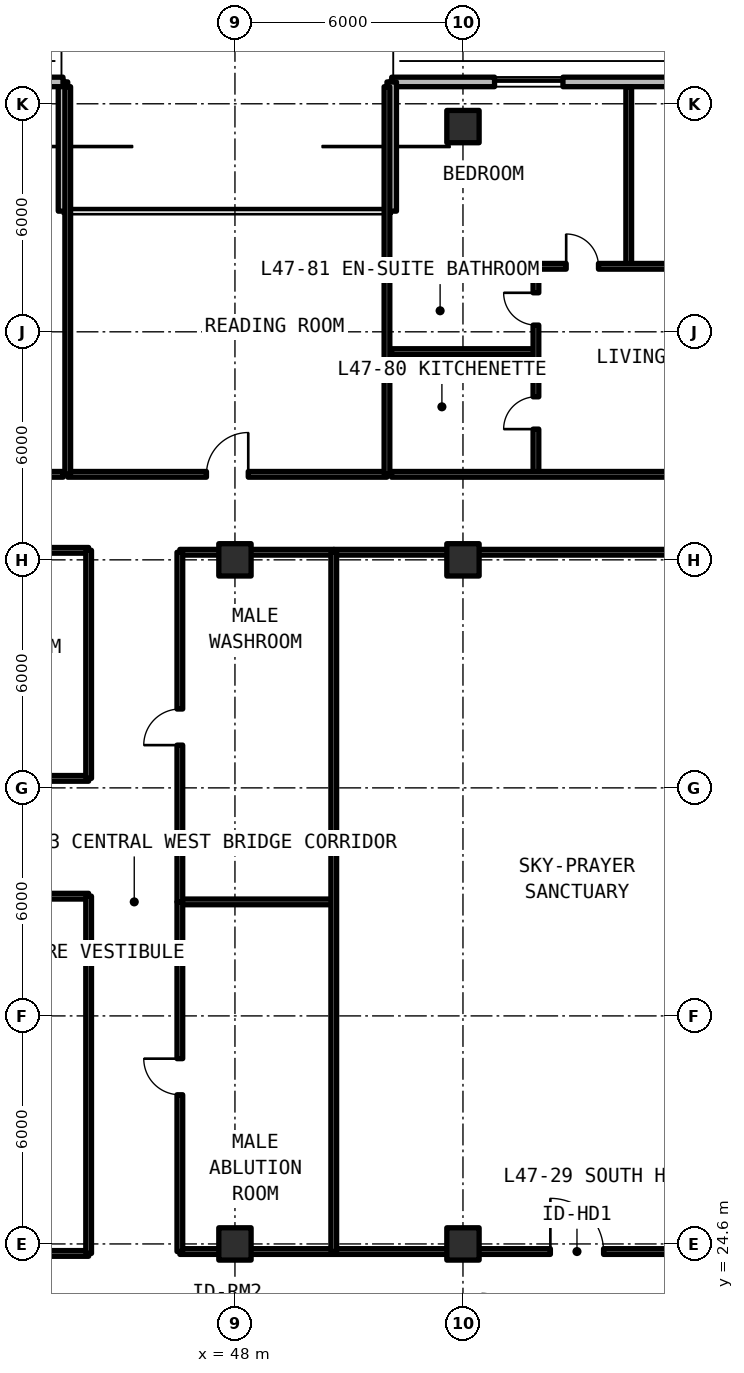
"""IFC4 building model, lengths in metres.
Left out: names, types, materials, properties, quantities, classifications, styles, units other than length and angle.
Written with IfcOpenShell. Run it as: python <this file> out.ifc"""

import sys

from ifc_helpers import new_model, si_unit, direction, frame, frame_2d, origin, origin_2d, place, context, subcontext, project, spatial, rectangle, extrude, element, fill, save


model = new_model("IFC4")
c1 = context("Model", 3, precision=1e-05, world=origin(), true_north=direction((0.0, 1.0)))
c2 = subcontext(c1, "Body", "Model", "MODEL_VIEW")
j1 = project(units=[si_unit("LENGTHUNIT", "METRE"), si_unit("PLANEANGLEUNIT", "RADIAN")], contexts=[c1])
p1 = place(None, origin())
s1 = spatial("IfcSite", under=j1, at=p1, CompositionType="ELEMENT")
p2 = place(p1, origin())
s2 = spatial("IfcBuilding", under=s1, at=p2, CompositionType="ELEMENT")
p3 = place(p2, frame((0.0, 0.0, 169.29)))
s3 = spatial("IfcBuildingStorey", under=s2, at=p3, CompositionType="ELEMENT", Elevation=169.29)
for number, where, z_axis, x_axis in (
    (1, (48.0, 24.6, 0.0), (0.0, 0.0, 1.0), (1.0, 0.0, 0.0)),
    (2, (48.0, 42.6, 0.0), (0.0, 0.0, 1.0), (1.0, 0.0, 0.0)),
    (3, (54.0, 24.6, 0.0), (0.0, 0.0, 1.0), (1.0, 0.0, 0.0)),
    (4, (54.0, 42.6, 0.0), (0.0, 0.0, 1.0), (1.0, 0.0, 0.0)),
    (5, (54.0, 54.0, 0.0), (0.0, 0.0, 1.0), (1.0, 0.0, 0.0)),
):
    element("IfcColumn", number, at=place(p3, frame(where, z_axis=z_axis, x_axis=x_axis)), inside=s3, PredefinedType="COLUMN", context=c2, shape_type="SweptSolid", body=[
        extrude(rectangle(XDim=0.85, YDim=0.85, at=origin_2d()), origin(), (0.0, 0.0, 1.0), 3.63),
    ])
p4 = place(p3, frame((95.748, 55.175, 0.0), z_axis=(0.0, 0.0, 1.0), x_axis=(-1.0, 0.0, 0.0)))
e6 = element("IfcWall", 6, at=p4, inside=s3, PredefinedType="SOLIDWALL", context=c2, shape_type="SweptSolid", body=[
    extrude(rectangle(XDim=43.623, YDim=0.25, at=frame_2d((21.812, 0.0))), origin(), (0.0, 0.0, 1.0), 3.35),
])
p5 = place(p4, frame((26.798, 0.0, 0.0)))
e7 = element("IfcOpeningElement", 7, at=p5, cuts=e6, PredefinedType="OPENING", context=c2, shape_type="SweptSolid", body=[
    extrude(rectangle(XDim=1.1, YDim=2.15, at=frame_2d((0.55, 1.075))), frame((0.0, 0.135, 0.0), z_axis=(0.0, -1.0, 0.0), x_axis=(1.0, 0.0, 0.0)), (0.0, 0.0, 1.0), 0.27),
])
p6 = place(p4, frame((19.448, 0.0, 0.0)))
e8 = element("IfcOpeningElement", 8, at=p6, cuts=e6, PredefinedType="OPENING", context=c2, shape_type="SweptSolid", body=[
    extrude(rectangle(XDim=1.1, YDim=2.15, at=frame_2d((0.55, 1.075))), frame((0.0, 0.135, 0.0), z_axis=(0.0, -1.0, 0.0), x_axis=(1.0, 0.0, 0.0)), (0.0, 0.0, 1.0), 0.27),
])
p7 = place(p4, frame((39.117, 0.0, 0.78)))
e9 = element("IfcOpeningElement", 9, at=p7, cuts=e6, PredefinedType="OPENING", context=c2, shape_type="SweptSolid", body=[
    extrude(rectangle(XDim=1.8, YDim=1.66, at=frame_2d((0.9, 0.83))), frame((0.0, 0.135, 0.0), z_axis=(0.0, -1.0, 0.0), x_axis=(1.0, 0.0, 0.0)), (0.0, 0.0, 1.0), 0.27),
])
p8 = place(p4, frame((33.135, 0.0, 0.78)))
e10 = element("IfcOpeningElement", 10, at=p8, cuts=e6, PredefinedType="OPENING", context=c2, shape_type="SweptSolid", body=[
    extrude(rectangle(XDim=1.8, YDim=1.66, at=frame_2d((0.9, 0.83))), frame((0.0, 0.135, 0.0), z_axis=(0.0, -1.0, 0.0), x_axis=(1.0, 0.0, 0.0)), (0.0, 0.0, 1.0), 0.27),
])
p9 = place(p4, frame((12.563, 0.0, 0.78)))
e11 = element("IfcOpeningElement", 11, at=p9, cuts=e6, PredefinedType="OPENING", context=c2, shape_type="SweptSolid", body=[
    extrude(rectangle(XDim=1.8, YDim=1.66, at=frame_2d((0.9, 0.83))), frame((0.0, 0.135, 0.0), z_axis=(0.0, -1.0, 0.0), x_axis=(1.0, 0.0, 0.0)), (0.0, 0.0, 1.0), 0.27),
])
p10 = place(p4, frame((3.116, 0.0, 0.78)))
e12 = element("IfcOpeningElement", 12, at=p10, cuts=e6, PredefinedType="OPENING", context=c2, shape_type="SweptSolid", body=[
    extrude(rectangle(XDim=1.8, YDim=1.66, at=frame_2d((0.9, 0.83))), frame((0.0, 0.135, 0.0), z_axis=(0.0, -1.0, 0.0), x_axis=(1.0, 0.0, 0.0)), (0.0, 0.0, 1.0), 0.27),
])
for number, where, z_axis, x_axis in (
    (13, (52.125, 55.175, 0.0), (0.0, 0.0, 1.0), (0.0, -1.0, 0.0)),
    (14, (43.475, 51.775, 0.0), (0.0, 0.0, 1.0), (0.0, 1.0, 0.0)),
):
    element("IfcWall", number, at=place(p3, frame(where, z_axis=z_axis, x_axis=x_axis)), inside=s3, PredefinedType="SOLIDWALL", context=c2, shape_type="SweptSolid", body=[
        extrude(rectangle(XDim=3.4, YDim=0.25, at=frame_2d((1.7, 0.0))), origin(), (0.0, 0.0, 1.0), 3.35),
    ])
p11 = place(p3, frame((43.475, 55.175, 0.0), z_axis=(0.0, 0.0, 1.0), x_axis=(-1.0, 0.0, 0.0)))
e15 = element("IfcWall", 15, at=p11, inside=s3, PredefinedType="SOLIDWALL", context=c2, shape_type="SweptSolid", body=[
    extrude(rectangle(XDim=19.623, YDim=0.25, at=frame_2d((9.812, 0.0))), origin(), (0.0, 0.0, 1.0), 3.35),
])
p12 = place(p11, frame((10.575, 0.0, 0.0)))
e16 = element("IfcOpeningElement", 16, at=p12, cuts=e15, PredefinedType="OPENING", context=c2, shape_type="SweptSolid", body=[
    extrude(rectangle(XDim=1.1, YDim=2.15, at=frame_2d((0.55, 1.075))), frame((0.0, 0.135, 0.0), z_axis=(0.0, -1.0, 0.0), x_axis=(1.0, 0.0, 0.0)), (0.0, 0.0, 1.0), 0.27),
])
p13 = place(p11, frame((18.08, 0.0, 0.78)))
e17 = element("IfcOpeningElement", 17, at=p13, cuts=e15, PredefinedType="OPENING", context=c2, shape_type="SweptSolid", body=[
    extrude(rectangle(XDim=0.85, YDim=1.65, at=frame_2d((0.425, 0.825))), frame((0.0, 0.135, 0.0), z_axis=(0.0, -1.0, 0.0), x_axis=(1.0, 0.0, 0.0)), (0.0, 0.0, 1.0), 0.27),
])
p14 = place(p11, frame((15.596, 0.0, 0.78)))
e18 = element("IfcOpeningElement", 18, at=p14, cuts=e15, PredefinedType="OPENING", context=c2, shape_type="SweptSolid", body=[
    extrude(rectangle(XDim=1.4, YDim=1.65, at=frame_2d((0.7, 0.825))), frame((0.0, 0.135, 0.0), z_axis=(0.0, -1.0, 0.0), x_axis=(1.0, 0.0, 0.0)), (0.0, 0.0, 1.0), 0.27),
])
p15 = place(p11, frame((8.369, 0.0, 0.78)))
e19 = element("IfcOpeningElement", 19, at=p15, cuts=e15, PredefinedType="OPENING", context=c2, shape_type="SweptSolid", body=[
    extrude(rectangle(XDim=0.85, YDim=1.65, at=frame_2d((0.425, 0.825))), frame((0.0, 0.135, 0.0), z_axis=(0.0, -1.0, 0.0), x_axis=(1.0, 0.0, 0.0)), (0.0, 0.0, 1.0), 0.27),
])
p16 = place(p11, frame((2.809, 0.0, 0.78)))
e20 = element("IfcOpeningElement", 20, at=p16, cuts=e15, PredefinedType="OPENING", context=c2, shape_type="SweptSolid", body=[
    extrude(rectangle(XDim=1.8, YDim=1.66, at=frame_2d((0.9, 0.83))), frame((0.0, 0.135, 0.0), z_axis=(0.0, -1.0, 0.0), x_axis=(1.0, 0.0, 0.0)), (0.0, 0.0, 1.0), 0.27),
])
p17 = place(p3, frame((36.27, 24.35, 0.0), z_axis=(0.0, 0.0, 1.0), x_axis=(1.0, 0.0, 0.0)))
e21 = element("IfcWall", 21, at=p17, inside=s3, PredefinedType="SOLIDWALL", context=c2, shape_type="SweptSolid", body=[
    extrude(rectangle(XDim=7.88, YDim=0.15, at=frame_2d((3.94, 0.0))), origin(), (0.0, 0.0, 1.0), 2.57),
])
p18 = place(p3, frame((36.27, 33.75, 0.0), z_axis=(0.0, 0.0, 1.0), x_axis=(1.0, 0.0, 0.0)))
e22 = element("IfcWall", 22, at=p18, inside=s3, PredefinedType="SOLIDWALL", context=c2, shape_type="SweptSolid", body=[
    extrude(rectangle(XDim=7.88, YDim=0.15, at=frame_2d((3.94, 0.0))), origin(), (0.0, 0.0, 1.0), 2.57),
])
p19 = place(p18, frame((3.465, 0.0, 0.0)))
e23 = element("IfcOpeningElement", 23, at=p19, cuts=e22, PredefinedType="OPENING", context=c2, shape_type="SweptSolid", body=[
    extrude(rectangle(XDim=0.95, YDim=2.15, at=frame_2d((0.475, 1.075))), frame((0.0, 0.085, 0.0), z_axis=(0.0, -1.0, 0.0), x_axis=(1.0, 0.0, 0.0)), (0.0, 0.0, 1.0), 0.17),
])
p20 = place(p3, frame((44.15, 24.35, 0.0), z_axis=(0.0, 0.0, 1.0), x_axis=(0.0, 1.0, 0.0)))
e24 = element("IfcWall", 24, at=p20, inside=s3, PredefinedType="SOLIDWALL", context=c2, shape_type="SweptSolid", body=[
    extrude(rectangle(XDim=9.4, YDim=0.15, at=frame_2d((4.7, 0.0))), origin(), (0.0, 0.0, 1.0), 2.57),
])
p21 = place(p3, frame((36.27, 36.85, 0.0), z_axis=(0.0, 0.0, 1.0), x_axis=(1.0, 0.0, 0.0)))
e25 = element("IfcWall", 25, at=p21, inside=s3, PredefinedType="SOLIDWALL", context=c2, shape_type="SweptSolid", body=[
    extrude(rectangle(XDim=7.88, YDim=0.15, at=frame_2d((3.94, 0.0))), origin(), (0.0, 0.0, 1.0), 2.57),
])
p22 = place(p21, frame((3.465, 0.0, 0.0)))
e26 = element("IfcOpeningElement", 26, at=p22, cuts=e25, PredefinedType="OPENING", context=c2, shape_type="SweptSolid", body=[
    extrude(rectangle(XDim=0.95, YDim=2.15, at=frame_2d((0.475, 1.075))), frame((0.0, 0.085, 0.0), z_axis=(0.0, -1.0, 0.0), x_axis=(1.0, 0.0, 0.0)), (0.0, 0.0, 1.0), 0.17),
])
p23 = place(p3, frame((36.27, 42.85, 0.0), z_axis=(0.0, 0.0, 1.0), x_axis=(1.0, 0.0, 0.0)))
e27 = element("IfcWall", 27, at=p23, inside=s3, PredefinedType="SOLIDWALL", context=c2, shape_type="SweptSolid", body=[
    extrude(rectangle(XDim=7.88, YDim=0.15, at=frame_2d((3.94, 0.0))), origin(), (0.0, 0.0, 1.0), 2.57),
])
p24 = place(p3, frame((44.15, 36.85, 0.0), z_axis=(0.0, 0.0, 1.0), x_axis=(0.0, 1.0, 0.0)))
e28 = element("IfcWall", 28, at=p24, inside=s3, PredefinedType="SOLIDWALL", context=c2, shape_type="SweptSolid", body=[
    extrude(rectangle(XDim=6.0, YDim=0.15, at=frame_2d((3.0, 0.0))), origin(), (0.0, 0.0, 1.0), 2.57),
])
for number, where, z_axis, x_axis in (
    (29, (46.55, 24.4, 0.0), (0.0, 0.0, 1.0), (1.0, 0.0, 0.0)),
    (30, (46.55, 33.6, 0.0), (0.0, 0.0, 1.0), (1.0, 0.0, 0.0)),
):
    element("IfcWall", number, at=place(p3, frame(where, z_axis=z_axis, x_axis=x_axis)), inside=s3, PredefinedType="SOLIDWALL", context=c2, shape_type="SweptSolid", body=[
        extrude(rectangle(XDim=4.05, YDim=0.15, at=frame_2d((2.025, 0.0))), origin(), (0.0, 0.0, 1.0), 2.57),
    ])
p25 = place(p3, frame((46.55, 24.4, 0.0), z_axis=(0.0, 0.0, 1.0), x_axis=(0.0, 1.0, 0.0)))
e31 = element("IfcWall", 31, at=p25, inside=s3, PredefinedType="SOLIDWALL", context=c2, shape_type="SweptSolid", body=[
    extrude(rectangle(XDim=9.2, YDim=0.15, at=frame_2d((4.6, 0.0))), origin(), (0.0, 0.0, 1.0), 2.57),
])
p26 = place(p25, frame((4.125, 0.0, 0.0)))
e32 = element("IfcOpeningElement", 32, at=p26, cuts=e31, PredefinedType="OPENING", context=c2, shape_type="SweptSolid", body=[
    extrude(rectangle(XDim=0.95, YDim=2.15, at=frame_2d((0.475, 1.075))), frame((0.0, 0.085, 0.0), z_axis=(0.0, -1.0, 0.0), x_axis=(1.0, 0.0, 0.0)), (0.0, 0.0, 1.0), 0.17),
])
p27 = place(p3, frame((46.55, 42.8, 0.0), z_axis=(0.0, 0.0, 1.0), x_axis=(1.0, 0.0, 0.0)))
e33 = element("IfcWall", 33, at=p27, inside=s3, PredefinedType="SOLIDWALL", context=c2, shape_type="SweptSolid", body=[
    extrude(rectangle(XDim=4.05, YDim=0.15, at=frame_2d((2.025, 0.0))), origin(), (0.0, 0.0, 1.0), 2.57),
])
p28 = place(p3, frame((46.55, 33.6, 0.0), z_axis=(0.0, 0.0, 1.0), x_axis=(0.0, 1.0, 0.0)))
e34 = element("IfcWall", 34, at=p28, inside=s3, PredefinedType="SOLIDWALL", context=c2, shape_type="SweptSolid", body=[
    extrude(rectangle(XDim=9.2, YDim=0.15, at=frame_2d((4.6, 0.0))), origin(), (0.0, 0.0, 1.0), 2.57),
])
p29 = place(p28, frame((4.125, 0.0, 0.0)))
e35 = element("IfcOpeningElement", 35, at=p29, cuts=e34, PredefinedType="OPENING", context=c2, shape_type="SweptSolid", body=[
    extrude(rectangle(XDim=0.95, YDim=2.15, at=frame_2d((0.475, 1.075))), frame((0.0, 0.085, 0.0), z_axis=(0.0, -1.0, 0.0), x_axis=(1.0, 0.0, 0.0)), (0.0, 0.0, 1.0), 0.17),
])
p30 = place(p3, frame((50.6, 24.4, 0.0), z_axis=(0.0, 0.0, 1.0), x_axis=(1.0, 0.0, 0.0)))
e36 = element("IfcWall", 36, at=p30, inside=s3, PredefinedType="SOLIDWALL", context=c2, shape_type="SweptSolid", body=[
    extrude(rectangle(XDim=12.8, YDim=0.15, at=frame_2d((6.4, 0.0))), origin(), (0.0, 0.0, 1.0), 2.57),
])
p31 = place(p30, frame((5.7, 0.0, 0.0)))
e37 = element("IfcOpeningElement", 37, at=p31, cuts=e36, PredefinedType="OPENING", context=c2, shape_type="SweptSolid", body=[
    extrude(rectangle(XDim=1.4, YDim=2.15, at=frame_2d((0.7, 1.075))), frame((0.0, 0.085, 0.0), z_axis=(0.0, -1.0, 0.0), x_axis=(1.0, 0.0, 0.0)), (0.0, 0.0, 1.0), 0.17),
])
p32 = place(p3, frame((50.6, 42.8, 0.0), z_axis=(0.0, 0.0, 1.0), x_axis=(1.0, 0.0, 0.0)))
e38 = element("IfcWall", 38, at=p32, inside=s3, PredefinedType="SOLIDWALL", context=c2, shape_type="SweptSolid", body=[
    extrude(rectangle(XDim=12.8, YDim=0.15, at=frame_2d((6.4, 0.0))), origin(), (0.0, 0.0, 1.0), 2.57),
])
p33 = place(p3, frame((50.6, 24.4, 0.0), z_axis=(0.0, 0.0, 1.0), x_axis=(0.0, 1.0, 0.0)))
e39 = element("IfcWall", 39, at=p33, inside=s3, PredefinedType="SOLIDWALL", context=c2, shape_type="SweptSolid", body=[
    extrude(rectangle(XDim=18.4, YDim=0.15, at=frame_2d((9.2, 0.0))), origin(), (0.0, 0.0, 1.0), 2.57),
])
p34 = place(p3, frame((43.6, 44.85, 0.0), z_axis=(0.0, 0.0, 1.0), x_axis=(1.0, 0.0, 0.0)))
e40 = element("IfcWall", 40, at=p34, inside=s3, PredefinedType="SOLIDWALL", context=c2, shape_type="SweptSolid", body=[
    extrude(rectangle(XDim=8.4, YDim=0.15, at=frame_2d((4.2, 0.0))), origin(), (0.0, 0.0, 1.0), 2.57),
])
p35 = place(p34, frame((3.65, 0.0, 0.0)))
e41 = element("IfcOpeningElement", 41, at=p35, cuts=e40, PredefinedType="OPENING", context=c2, shape_type="SweptSolid", body=[
    extrude(rectangle(XDim=1.1, YDim=2.15, at=frame_2d((0.55, 1.075))), frame((0.0, 0.085, 0.0), z_axis=(0.0, -1.0, 0.0), x_axis=(1.0, 0.0, 0.0)), (0.0, 0.0, 1.0), 0.17),
])
for number, where, z_axis, x_axis in (
    (42, (43.6, 44.85, 0.0), (0.0, 0.0, 1.0), (0.0, 1.0, 0.0)),
    (43, (52.0, 44.85, 0.0), (0.0, 0.0, 1.0), (0.0, 1.0, 0.0)),
):
    element("IfcWall", number, at=place(p3, frame(where, z_axis=z_axis, x_axis=x_axis)), inside=s3, PredefinedType="SOLIDWALL", context=c2, shape_type="SweptSolid", body=[
        extrude(rectangle(XDim=10.2, YDim=0.15, at=frame_2d((5.1, 0.0))), origin(), (0.0, 0.0, 1.0), 2.57),
    ])
p36 = place(p3, frame((36.051, 44.85, 0.0), z_axis=(0.0, 0.0, 1.0), x_axis=(1.0, 0.0, 0.0)))
e44 = element("IfcWall", 44, at=p36, inside=s3, PredefinedType="SOLIDWALL", context=c2, shape_type="SweptSolid", body=[
    extrude(rectangle(XDim=7.429, YDim=0.15, at=frame_2d((3.714, 0.0))), origin(), (0.0, 0.0, 1.0), 2.57),
])
p37 = place(p36, frame((3.164, 0.0, 0.0)))
e45 = element("IfcOpeningElement", 45, at=p37, cuts=e44, PredefinedType="OPENING", context=c2, shape_type="SweptSolid", body=[
    extrude(rectangle(XDim=1.1, YDim=2.15, at=frame_2d((0.55, 1.075))), frame((0.0, 0.085, 0.0), z_axis=(0.0, -1.0, 0.0), x_axis=(1.0, 0.0, 0.0)), (0.0, 0.0, 1.0), 0.17),
])
p38 = place(p3, frame((52.12, 48.08, 0.0), z_axis=(0.0, 0.0, 1.0), x_axis=(1.0, 0.0, 0.0)))
e46 = element("IfcWall", 46, at=p38, inside=s3, PredefinedType="PARTITIONING", context=c2, shape_type="SweptSolid", body=[
    extrude(rectangle(XDim=3.8, YDim=0.15, at=frame_2d((1.9, 0.0))), origin(), (0.0, 0.0, 1.0), 2.57),
])
p39 = place(p3, frame((55.92, 44.85, 0.0), z_axis=(0.0, 0.0, 1.0), x_axis=(0.0, 1.0, 0.0)))
e47 = element("IfcWall", 47, at=p39, inside=s3, PredefinedType="PARTITIONING", context=c2, shape_type="SweptSolid", body=[
    extrude(rectangle(XDim=5.474, YDim=0.15, at=frame_2d((2.737, 0.0))), origin(), (0.0, 0.0, 1.0), 2.57),
])
p40 = place(p39, frame((1.19, 0.0, 0.0)))
e48 = element("IfcOpeningElement", 48, at=p40, cuts=e47, PredefinedType="OPENING", context=c2, shape_type="SweptSolid", body=[
    extrude(rectangle(XDim=0.85, YDim=2.1, at=frame_2d((0.425, 1.05))), frame((0.0, 0.085, 0.0), z_axis=(0.0, -1.0, 0.0), x_axis=(1.0, 0.0, 0.0)), (0.0, 0.0, 1.0), 0.17),
])
p41 = place(p39, frame((3.927, 0.0, 0.0)))
e49 = element("IfcOpeningElement", 49, at=p41, cuts=e47, PredefinedType="OPENING", context=c2, shape_type="SweptSolid", body=[
    extrude(rectangle(XDim=0.85, YDim=2.1, at=frame_2d((0.425, 1.05))), frame((0.0, 0.085, 0.0), z_axis=(0.0, -1.0, 0.0), x_axis=(1.0, 0.0, 0.0)), (0.0, 0.0, 1.0), 0.17),
])
p42 = place(p3, frame((58.362, 50.324, 0.0), z_axis=(0.0, 0.0, 1.0), x_axis=(0.0, 1.0, 0.0)))
e50 = element("IfcWall", 50, at=p42, inside=s3, PredefinedType="PARTITIONING", context=c2, shape_type="SweptSolid", body=[
    extrude(rectangle(XDim=4.726, YDim=0.15, at=frame_2d((2.363, 0.0))), origin(), (0.0, 0.0, 1.0), 2.57),
])
p43 = place(p3, frame((52.12, 50.324, 0.0), z_axis=(0.0, 0.0, 1.0), x_axis=(1.0, 0.0, 0.0)))
e51 = element("IfcWall", 51, at=p43, inside=s3, PredefinedType="PARTITIONING", context=c2, shape_type="SweptSolid", body=[
    extrude(rectangle(XDim=12.004, YDim=0.15, at=frame_2d((6.002, 0.0))), origin(), (0.0, 0.0, 1.0), 2.57),
])
p44 = place(p43, frame((4.596, 0.0, 0.0)))
e52 = element("IfcOpeningElement", 52, at=p44, cuts=e51, PredefinedType="OPENING", context=c2, shape_type="SweptSolid", body=[
    extrude(rectangle(XDim=0.85, YDim=2.1, at=frame_2d((0.425, 1.05))), frame((0.0, 0.085, 0.0), z_axis=(0.0, -1.0, 0.0), x_axis=(1.0, 0.0, 0.0)), (0.0, 0.0, 1.0), 0.17),
])
p45 = place(p43, frame((8.698, 0.0, 0.0)))
e53 = element("IfcOpeningElement", 53, at=p45, cuts=e51, PredefinedType="OPENING", context=c2, shape_type="SweptSolid", body=[
    extrude(rectangle(XDim=0.85, YDim=2.1, at=frame_2d((0.425, 1.05))), frame((0.0, 0.085, 0.0), z_axis=(0.0, -1.0, 0.0), x_axis=(1.0, 0.0, 0.0)), (0.0, 0.0, 1.0), 0.17),
])
p46 = place(p3, frame((52.12, 44.85, 0.0), z_axis=(0.0, 0.0, 1.0), x_axis=(1.0, 0.0, 0.0)))
e54 = element("IfcWall", 54, at=p46, inside=s3, PredefinedType="SOLIDWALL", context=c2, shape_type="SweptSolid", body=[
    extrude(rectangle(XDim=12.004, YDim=0.15, at=frame_2d((6.002, 0.0))), origin(), (0.0, 0.0, 1.0), 2.57),
])
p47 = place(p46, frame((7.467, 0.0, 0.0)))
e55 = element("IfcOpeningElement", 55, at=p47, cuts=e54, PredefinedType="OPENING", context=c2, shape_type="SweptSolid", body=[
    extrude(rectangle(XDim=0.95, YDim=2.15, at=frame_2d((0.475, 1.075))), frame((0.0, 0.085, 0.0), z_axis=(0.0, -1.0, 0.0), x_axis=(1.0, 0.0, 0.0)), (0.0, 0.0, 1.0), 0.17),
])
p48 = place(p7, origin())
e56 = element("IfcWindow", 56, at=p48, inside=s3, PartitioningType="SINGLE_PANEL", PredefinedType="WINDOW", context=c2, shape_type="SweptSolid", body=[
    extrude(rectangle(XDim=1.8, YDim=1.66, at=frame_2d((0.9, 0.83))), frame((0.0, 0.03, 0.0), z_axis=(0.0, -1.0, 0.0), x_axis=(1.0, 0.0, 0.0)), (0.0, 0.0, 1.0), 0.06),
])
fill(e9, e56)
p49 = place(p26, origin())
e57 = element("IfcDoor", 57, at=p49, inside=s3, OperationType="SINGLE_SWING_RIGHT", PredefinedType="DOOR", context=c2, shape_type="SweptSolid", body=[
    extrude(rectangle(XDim=0.95, YDim=2.15, at=frame_2d((0.475, 1.075))), frame((0.0, 0.025, 0.0), z_axis=(0.0, -1.0, 0.0), x_axis=(1.0, 0.0, 0.0)), (0.0, 0.0, 1.0), 0.05),
])
fill(e32, e57)
p50 = place(p29, origin())
e58 = element("IfcDoor", 58, at=p50, inside=s3, OperationType="SINGLE_SWING_LEFT", PredefinedType="DOOR", context=c2, shape_type="SweptSolid", body=[
    extrude(rectangle(XDim=0.95, YDim=2.15, at=frame_2d((0.475, 1.075))), frame((0.0, 0.025, 0.0), z_axis=(0.0, -1.0, 0.0), x_axis=(1.0, 0.0, 0.0)), (0.0, 0.0, 1.0), 0.05),
])
fill(e35, e58)
p51 = place(p31, origin())
e59 = element("IfcDoor", 59, at=p51, inside=s3, OperationType="SINGLE_SWING_RIGHT", PredefinedType="DOOR", context=c2, shape_type="SweptSolid", body=[
    extrude(rectangle(XDim=1.4, YDim=2.15, at=frame_2d((0.7, 1.075))), frame((0.0, 0.025, 0.0), z_axis=(0.0, -1.0, 0.0), x_axis=(1.0, 0.0, 0.0)), (0.0, 0.0, 1.0), 0.05),
])
fill(e37, e59)
p52 = place(p35, origin())
e60 = element("IfcDoor", 60, at=p52, inside=s3, OperationType="SINGLE_SWING_RIGHT", PredefinedType="DOOR", context=c2, shape_type="SweptSolid", body=[
    extrude(rectangle(XDim=1.1, YDim=2.15, at=frame_2d((0.55, 1.075))), frame((0.0, 0.025, 0.0), z_axis=(0.0, -1.0, 0.0), x_axis=(1.0, 0.0, 0.0)), (0.0, 0.0, 1.0), 0.05),
])
fill(e41, e60)
p53 = place(p40, origin())
e61 = element("IfcDoor", 61, at=p53, inside=s3, OperationType="SINGLE_SWING_LEFT", PredefinedType="DOOR", context=c2, shape_type="SweptSolid", body=[
    extrude(rectangle(XDim=0.85, YDim=2.1, at=frame_2d((0.425, 1.05))), frame((0.0, 0.025, 0.0), z_axis=(0.0, -1.0, 0.0), x_axis=(1.0, 0.0, 0.0)), (0.0, 0.0, 1.0), 0.05),
])
fill(e48, e61)
p54 = place(p41, origin())
e62 = element("IfcDoor", 62, at=p54, inside=s3, OperationType="SINGLE_SWING_RIGHT", PredefinedType="DOOR", context=c2, shape_type="SweptSolid", body=[
    extrude(rectangle(XDim=0.85, YDim=2.1, at=frame_2d((0.425, 1.05))), frame((0.0, 0.025, 0.0), z_axis=(0.0, -1.0, 0.0), x_axis=(1.0, 0.0, 0.0)), (0.0, 0.0, 1.0), 0.05),
])
fill(e49, e62)
p55 = place(p44, origin())
e63 = element("IfcDoor", 63, at=p55, inside=s3, OperationType="SINGLE_SWING_LEFT", PredefinedType="DOOR", context=c2, shape_type="SweptSolid", body=[
    extrude(rectangle(XDim=0.85, YDim=2.1, at=frame_2d((0.425, 1.05))), frame((0.0, 0.025, 0.0), z_axis=(0.0, -1.0, 0.0), x_axis=(1.0, 0.0, 0.0)), (0.0, 0.0, 1.0), 0.05),
])
fill(e52, e63)
save(model, sys.argv[1])
